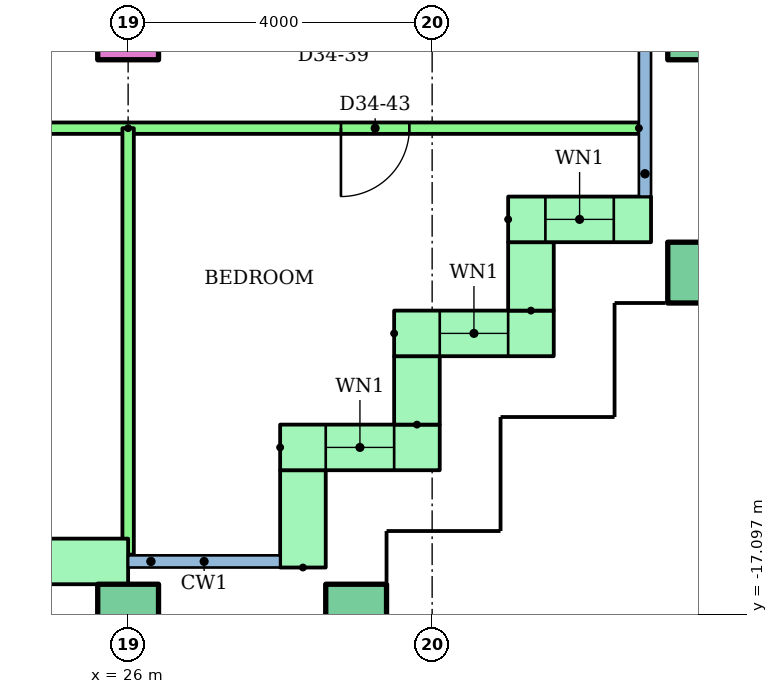
"""IFC4 building model, lengths in metres.
Left out: names, types, materials, properties, quantities, classifications, styles, units other than length and angle.
Written with IfcOpenShell. Run it as: python <this file> out.ifc"""

import sys

from ifc_helpers import new_model, si_unit, direction, frame, frame_2d, origin, origin_2d, place, context, subcontext, project, spatial, rectangle, hollow_rectangle, extrude, element, fill, save


model = new_model("IFC4")
c1 = context("Model", 3, precision=1e-05, world=origin(), true_north=direction((0.0, 1.0)))
c2 = subcontext(c1, "Body", "Model", "MODEL_VIEW")
j1 = project(units=[si_unit("LENGTHUNIT", "METRE"), si_unit("PLANEANGLEUNIT", "RADIAN")], contexts=[c1])
p1 = place(None, origin())
s1 = spatial("IfcSite", under=j1, at=p1, CompositionType="ELEMENT")
p2 = place(p1, origin())
s2 = spatial("IfcBuilding", under=s1, at=p2, CompositionType="ELEMENT")
p3 = place(p2, frame((0.0, 0.0, 132.6)))
s3 = spatial("IfcBuildingStorey", under=s2, at=p3, CompositionType="ELEMENT", Elevation=132.6)
for number, where in (
    (1, (26.0, -17.1, 0.0)),
    (2, (29.0, -17.1, 0.0)),
    (3, (33.5, -12.6, 0.0)),
):
    element("IfcColumn", number, at=place(p3, frame(where)), inside=s3, PredefinedType="COLUMN", context=c2, shape_type="SweptSolid", body=[
        extrude(hollow_rectangle(XDim=0.8, YDim=0.8, WallThickness=0.04, at=origin_2d()), origin(), (0.0, 0.0, 1.0), 3.2),
    ])
p4 = place(p3, frame((26.0, -9.4, 0.0)))
e4 = element("IfcColumn", 4, at=p4, inside=s3, PredefinedType="COLUMN", context=c2, shape_type="SweptSolid", body=[
    extrude(rectangle(XDim=0.8, YDim=0.8, at=origin_2d()), origin(), (0.0, 0.0, 1.0), 3.2),
])
p5 = place(p3, frame((33.5, -9.4, 0.0)))
e5 = element("IfcColumn", 5, at=p5, inside=s3, PredefinedType="COLUMN", context=c2, shape_type="SweptSolid", body=[
    extrude(hollow_rectangle(XDim=0.8, YDim=0.8, WallThickness=0.04, at=origin_2d()), origin(), (0.0, 0.0, 1.0), 3.2),
])
p6 = place(p3, frame((22.0, -16.4, 0.0)))
e6 = element("IfcWall", 6, at=p6, inside=s3, PredefinedType="STANDARD", context=c2, shape_type="SweptSolid", body=[
    extrude(rectangle(XDim=4.0, YDim=0.6, at=frame_2d((2.0, 0.0))), origin(), (0.0, 0.0, 1.0), 2.92),
])
p7 = place(p6, frame((1.4, 0.0, 0.0)))
e7 = element("IfcOpeningElement", 7, at=p7, cuts=e6, PredefinedType="OPENING", context=c2, shape_type="SweptSolid", body=[
    extrude(rectangle(XDim=1.2, YDim=2.1, at=frame_2d((0.6, 1.05))), frame((0.0, 0.31, 0.0), z_axis=(0.0, -1.0, 0.0), x_axis=(1.0, 0.0, 0.0)), (0.0, 0.0, 1.0), 0.62),
])
p8 = place(p3, frame((28.3, -16.48, 0.0), z_axis=(0.0, 0.0, 1.0), x_axis=(0.0, 1.0, 0.0)))
e8 = element("IfcWall", 8, at=p8, inside=s3, PredefinedType="STANDARD", context=c2, shape_type="SweptSolid", body=[
    extrude(rectangle(XDim=1.28, YDim=0.6, at=frame_2d((0.64, 0.0))), origin(), (0.0, 0.0, 1.0), 2.92),
])
p9 = place(p3, frame((28.0, -14.9, 0.0)))
e9 = element("IfcWall", 9, at=p9, inside=s3, PredefinedType="STANDARD", context=c2, shape_type="SweptSolid", body=[
    extrude(rectangle(XDim=2.1, YDim=0.6, at=frame_2d((1.05, 0.0))), origin(), (0.0, 0.0, 1.0), 2.92),
])
p10 = place(p9, frame((0.6, 0.0, 0.9)))
e10 = element("IfcOpeningElement", 10, at=p10, cuts=e9, PredefinedType="OPENING", context=c2, shape_type="SweptSolid", body=[
    extrude(rectangle(XDim=0.9, YDim=1.5, at=frame_2d((0.45, 0.75))), frame((0.0, 0.31, 0.0), z_axis=(0.0, -1.0, 0.0), x_axis=(1.0, 0.0, 0.0)), (0.0, 0.0, 1.0), 0.62),
])
p11 = place(p3, frame((29.8, -14.6, 0.0), z_axis=(0.0, 0.0, 1.0), x_axis=(0.0, 1.0, 0.0)))
e11 = element("IfcWall", 11, at=p11, inside=s3, PredefinedType="STANDARD", context=c2, shape_type="SweptSolid", body=[
    extrude(rectangle(XDim=0.9, YDim=0.6, at=frame_2d((0.45, 0.0))), origin(), (0.0, 0.0, 1.0), 2.92),
])
p12 = place(p3, frame((29.5, -13.4, 0.0)))
e12 = element("IfcWall", 12, at=p12, inside=s3, PredefinedType="STANDARD", context=c2, shape_type="SweptSolid", body=[
    extrude(rectangle(XDim=2.1, YDim=0.6, at=frame_2d((1.05, 0.0))), origin(), (0.0, 0.0, 1.0), 2.92),
])
p13 = place(p12, frame((0.6, 0.0, 0.9)))
e13 = element("IfcOpeningElement", 13, at=p13, cuts=e12, PredefinedType="OPENING", context=c2, shape_type="SweptSolid", body=[
    extrude(rectangle(XDim=0.9, YDim=1.5, at=frame_2d((0.45, 0.75))), frame((0.0, 0.31, 0.0), z_axis=(0.0, -1.0, 0.0), x_axis=(1.0, 0.0, 0.0)), (0.0, 0.0, 1.0), 0.62),
])
p14 = place(p3, frame((31.3, -13.1, 0.0), z_axis=(0.0, 0.0, 1.0), x_axis=(0.0, 1.0, 0.0)))
e14 = element("IfcWall", 14, at=p14, inside=s3, PredefinedType="STANDARD", context=c2, shape_type="SweptSolid", body=[
    extrude(rectangle(XDim=0.9, YDim=0.6, at=frame_2d((0.45, 0.0))), origin(), (0.0, 0.0, 1.0), 2.92),
])
p15 = place(p3, frame((31.0, -11.9, 0.0)))
e15 = element("IfcWall", 15, at=p15, inside=s3, PredefinedType="STANDARD", context=c2, shape_type="SweptSolid", body=[
    extrude(rectangle(XDim=1.88, YDim=0.6, at=frame_2d((0.94, 0.0))), origin(), (0.0, 0.0, 1.0), 2.92),
])
p16 = place(p15, frame((0.49, 0.0, 0.9)))
e16 = element("IfcOpeningElement", 16, at=p16, cuts=e15, PredefinedType="OPENING", context=c2, shape_type="SweptSolid", body=[
    extrude(rectangle(XDim=0.9, YDim=1.5, at=frame_2d((0.45, 0.75))), frame((0.0, 0.31, 0.0), z_axis=(0.0, -1.0, 0.0), x_axis=(1.0, 0.0, 0.0)), (0.0, 0.0, 1.0), 0.62),
])
p17 = place(p3, frame((32.72, -10.7, 0.0), z_axis=(0.0, 0.0, 1.0), x_axis=(-1.0, 0.0, 0.0)))
e17 = element("IfcWall", 17, at=p17, inside=s3, PredefinedType="PARTITIONING", context=c2, shape_type="SweptSolid", body=[
    extrude(rectangle(XDim=22.72, YDim=0.15, at=frame_2d((11.36, 0.0))), origin(), (0.0, 0.0, 1.0), 2.4),
])
p18 = place(p17, frame((20.27, 0.0, 0.0)))
e18 = element("IfcOpeningElement", 18, at=p18, cuts=e17, PredefinedType="OPENING", context=c2, shape_type="SweptSolid", body=[
    extrude(rectangle(XDim=0.9, YDim=2.1, at=frame_2d((0.45, 1.05))), frame((0.0, 0.085, 0.0), z_axis=(0.0, -1.0, 0.0), x_axis=(1.0, 0.0, 0.0)), (0.0, 0.0, 1.0), 0.17),
])
p19 = place(p17, frame((16.27, 0.0, 0.0)))
e19 = element("IfcOpeningElement", 19, at=p19, cuts=e17, PredefinedType="OPENING", context=c2, shape_type="SweptSolid", body=[
    extrude(rectangle(XDim=0.9, YDim=2.1, at=frame_2d((0.45, 1.05))), frame((0.0, 0.085, 0.0), z_axis=(0.0, -1.0, 0.0), x_axis=(1.0, 0.0, 0.0)), (0.0, 0.0, 1.0), 0.17),
])
p20 = place(p17, frame((10.22, 0.0, 0.0)))
e20 = element("IfcOpeningElement", 20, at=p20, cuts=e17, PredefinedType="OPENING", context=c2, shape_type="SweptSolid", body=[
    extrude(rectangle(XDim=1.0, YDim=2.1, at=frame_2d((0.5, 1.05))), frame((0.0, 0.085, 0.0), z_axis=(0.0, -1.0, 0.0), x_axis=(1.0, 0.0, 0.0)), (0.0, 0.0, 1.0), 0.17),
])
p21 = place(p17, frame((3.02, 0.0, 0.0)))
e21 = element("IfcOpeningElement", 21, at=p21, cuts=e17, PredefinedType="OPENING", context=c2, shape_type="SweptSolid", body=[
    extrude(rectangle(XDim=0.9, YDim=2.1, at=frame_2d((0.45, 1.05))), frame((0.0, 0.085, 0.0), z_axis=(0.0, -1.0, 0.0), x_axis=(1.0, 0.0, 0.0)), (0.0, 0.0, 1.0), 0.17),
])
p22 = place(p3, frame((26.0, -10.7, 0.0), z_axis=(0.0, 0.0, 1.0), x_axis=(0.0, -1.0, 0.0)))
e22 = element("IfcWall", 22, at=p22, inside=s3, PredefinedType="PARTITIONING", context=c2, shape_type="SweptSolid", body=[
    extrude(rectangle(XDim=5.61, YDim=0.15, at=frame_2d((2.805, 0.0))), origin(), (0.0, 0.0, 1.0), 2.4),
])
p23 = place(p10, origin())
e23 = element("IfcWindow", 23, at=p23, inside=s3, PartitioningType="SINGLE_PANEL", PredefinedType="WINDOW", context=c2, shape_type="SweptSolid", body=[
    extrude(rectangle(XDim=0.9, YDim=1.5, at=frame_2d((0.45, 0.75))), frame((0.0, 0.03, 0.0), z_axis=(0.0, -1.0, 0.0), x_axis=(1.0, 0.0, 0.0)), (0.0, 0.0, 1.0), 0.06),
])
fill(e10, e23)
p24 = place(p13, origin())
e24 = element("IfcWindow", 24, at=p24, inside=s3, PartitioningType="SINGLE_PANEL", PredefinedType="WINDOW", context=c2, shape_type="SweptSolid", body=[
    extrude(rectangle(XDim=0.9, YDim=1.5, at=frame_2d((0.45, 0.75))), frame((0.0, 0.03, 0.0), z_axis=(0.0, -1.0, 0.0), x_axis=(1.0, 0.0, 0.0)), (0.0, 0.0, 1.0), 0.06),
])
fill(e13, e24)
p25 = place(p16, origin())
e25 = element("IfcWindow", 25, at=p25, inside=s3, PartitioningType="SINGLE_PANEL", PredefinedType="WINDOW", context=c2, shape_type="SweptSolid", body=[
    extrude(rectangle(XDim=0.9, YDim=1.5, at=frame_2d((0.45, 0.75))), frame((0.0, 0.03, 0.0), z_axis=(0.0, -1.0, 0.0), x_axis=(1.0, 0.0, 0.0)), (0.0, 0.0, 1.0), 0.06),
])
fill(e16, e25)
p26 = place(p21, origin())
e26 = element("IfcDoor", 26, at=p26, inside=s3, OperationType="SINGLE_SWING_RIGHT", PredefinedType="DOOR", context=c2, shape_type="SweptSolid", body=[
    extrude(rectangle(XDim=0.9, YDim=2.1, at=frame_2d((0.45, 1.05))), frame((0.0, 0.025, 0.0), z_axis=(0.0, -1.0, 0.0), x_axis=(1.0, 0.0, 0.0)), (0.0, 0.0, 1.0), 0.05),
])
fill(e21, e26)
save(model, sys.argv[1])
